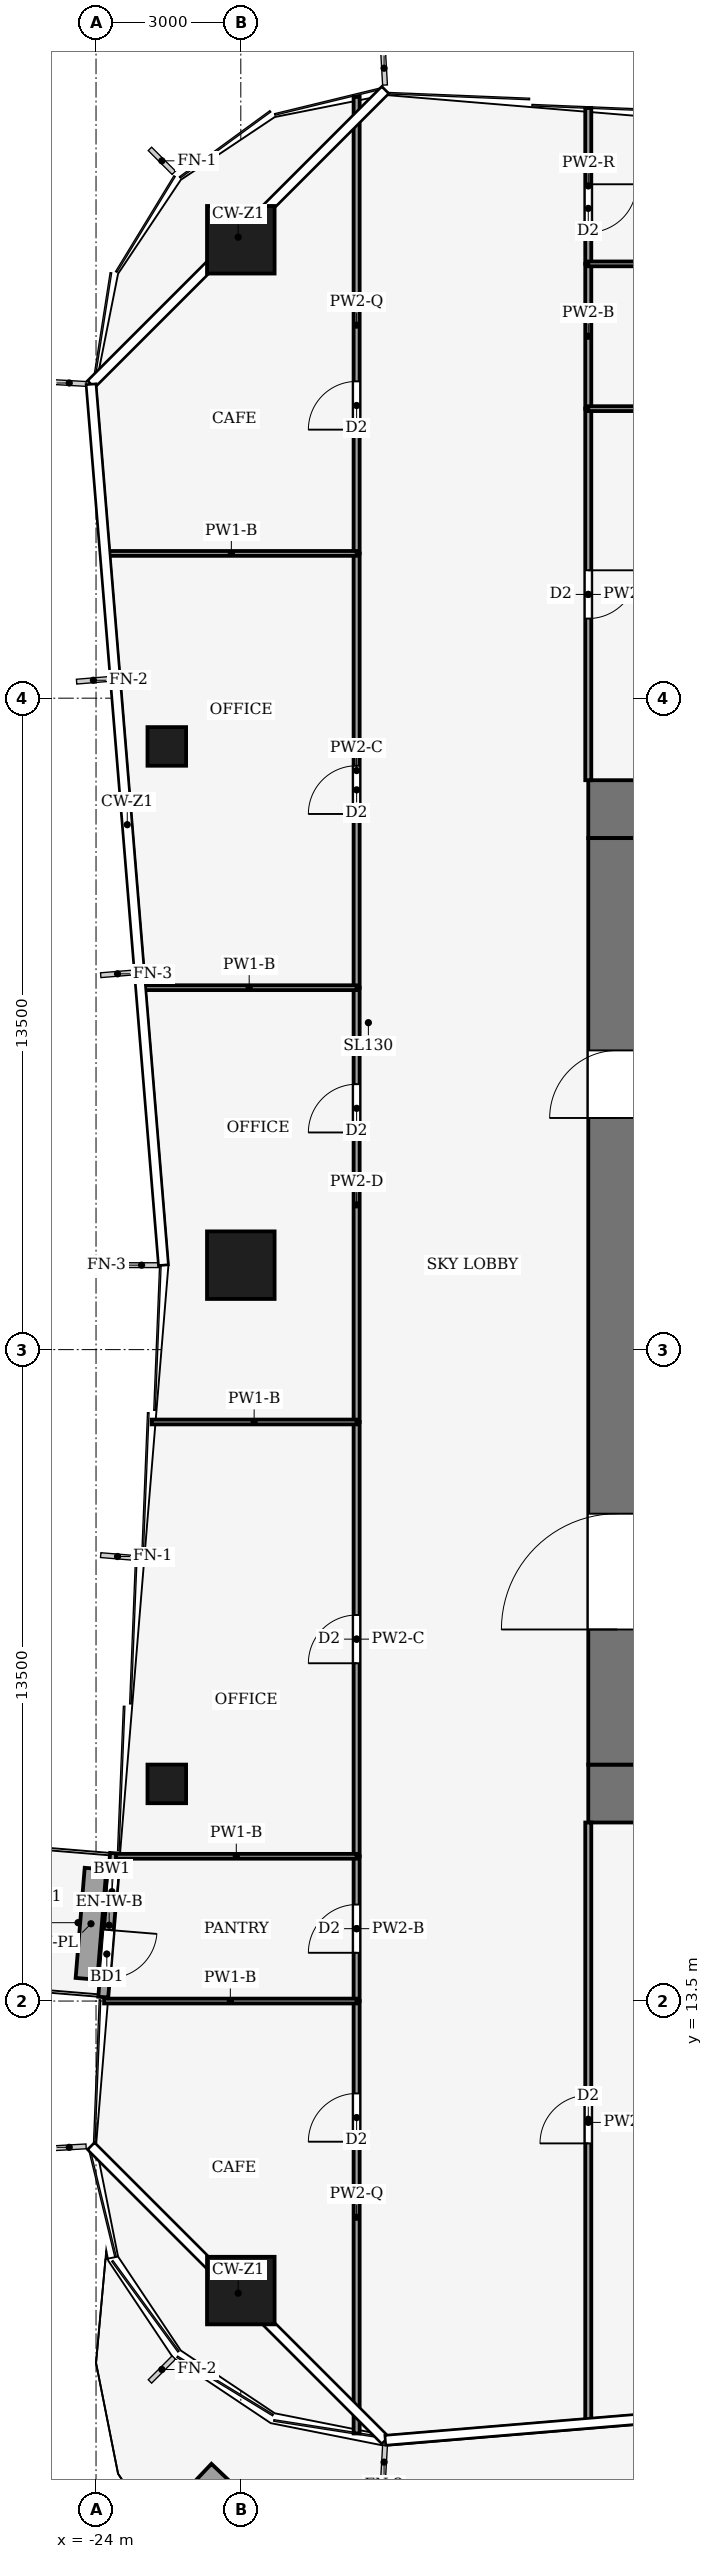
"""IFC4 building model, lengths in metres.
Left out: names, types, materials, properties, quantities, classifications, styles, units other than length and angle.
Written with IfcOpenShell. Run it as: python <this file> out.ifc"""

import sys

from ifc_helpers import new_model, si_unit, direction, frame, frame_2d, origin, origin_2d, place, context, subcontext, project, spatial, rectangle, hollow_rectangle, extrude, element, fill, save


model = new_model("IFC4")
c1 = context("Model", 3, precision=1e-05, world=origin(), true_north=direction((0.0, 1.0)))
c2 = subcontext(c1, "Body", "Model", "MODEL_VIEW")
j1 = project(units=[si_unit("LENGTHUNIT", "METRE"), si_unit("PLANEANGLEUNIT", "RADIAN")], contexts=[c1])
p1 = place(None, origin())
s1 = spatial("IfcSite", under=j1, at=p1, CompositionType="ELEMENT")
p2 = place(p1, origin())
s2 = spatial("IfcBuilding", under=s1, at=p2, CompositionType="ELEMENT")
p3 = place(p2, frame((0.0, 0.0, 65.0)))
s3 = spatial("IfcBuildingStorey", under=s2, at=p3, CompositionType="ELEMENT", Elevation=65.0)
for number, where, z_axis, x_axis in (
    (1, (-13.8, 17.8, -0.13), (0.0, 0.0, 1.0), (1.0, 0.0, 0.0)),
    (2, (-13.8, 38.2, -0.13), (0.0, 0.0, 1.0), (1.0, 0.0, 0.0)),
):
    element("IfcWall", number, at=place(p3, frame(where, z_axis=z_axis, x_axis=x_axis)), inside=s3, PredefinedType="SHEAR", context=c2, shape_type="SweptSolid", body=[
        extrude(rectangle(XDim=27.6, YDim=1.2, at=frame_2d((13.8, 0.0))), origin(), (0.0, 0.0, 1.0), 5.0),
    ])
p4 = place(p3, frame((-13.2, 18.4, -0.13), z_axis=(0.0, 0.0, 1.0), x_axis=(0.0, 1.0, 0.0)))
e3 = element("IfcWall", 3, at=p4, inside=s3, PredefinedType="SHEAR", context=c2, shape_type="SweptSolid", body=[
    extrude(rectangle(XDim=19.2, YDim=1.2, at=frame_2d((9.6, 0.0))), origin(), (0.0, 0.0, 1.0), 5.0),
])
p5 = place(p4, frame((2.8, 0.0, 0.13)))
e4 = element("IfcOpeningElement", 4, at=p5, cuts=e3, PredefinedType="OPENING", context=c2, shape_type="SweptSolid", body=[
    extrude(rectangle(XDim=2.4, YDim=2.4, at=frame_2d((1.2, 1.2))), frame((0.0, 0.61, 0.0), z_axis=(0.0, -1.0, 0.0), x_axis=(1.0, 0.0, 0.0)), (0.0, 0.0, 1.0), 1.22),
])
p6 = place(p4, frame((13.4, 0.0, 0.13)))
e5 = element("IfcOpeningElement", 5, at=p6, cuts=e3, PredefinedType="OPENING", context=c2, shape_type="SweptSolid", body=[
    extrude(rectangle(XDim=1.4, YDim=2.2, at=frame_2d((0.7, 1.1))), frame((0.0, 0.61, 0.0), z_axis=(0.0, -1.0, 0.0), x_axis=(1.0, 0.0, 0.0)), (0.0, 0.0, 1.0), 1.22),
])
for number, where, z_axis, x_axis in (
    (6, (-21.0, 50.0, 0.0), (0.0, 0.0, 1.0), (1.0, 0.0, 0.0)),
    (7, (-21.0, 7.5, 0.0), (0.0, 0.0, 1.0), (1.0, 0.0, 0.0)),
    (8, (-21.0, 28.75, 0.0), (0.0, 0.0, 1.0), (1.0, 0.0, 0.0)),
):
    element("IfcColumn", number, at=place(p3, frame(where, z_axis=z_axis, x_axis=x_axis)), inside=s3, PredefinedType="COLUMN", context=c2, shape_type="SweptSolid", body=[
        extrude(hollow_rectangle(XDim=1.4, YDim=1.4, WallThickness=0.08, at=origin_2d()), origin(), (0.0, 0.0, 1.0), 5.0),
    ])
for number, where, z_axis, x_axis in (
    (9, (-22.534, 18.0, 0.0), (0.0, 0.0, 1.0), (1.0, 0.0, 0.0)),
    (10, (-22.534, 39.5, 0.0), (0.0, 0.0, 1.0), (1.0, 0.0, 0.0)),
):
    element("IfcColumn", number, at=place(p3, frame(where, z_axis=z_axis, x_axis=x_axis)), inside=s3, PredefinedType="COLUMN", context=c2, shape_type="SweptSolid", body=[
        extrude(hollow_rectangle(XDim=0.8, YDim=0.8, WallThickness=0.04, at=origin_2d()), origin(), (0.0, 0.0, 1.0), 5.0),
    ])
p7 = place(p3, frame((-23.605, 16.561, 0.0), z_axis=(0.0, 0.0, 1.0), x_axis=(-0.081903334605, -0.996640278024, 0.0)))
e11 = element("IfcWall", 11, at=p7, inside=s3, PredefinedType="SOLIDWALL", context=c2, shape_type="SweptSolid", body=[
    extrude(rectangle(XDim=2.99, YDim=0.206, at=frame_2d((1.495, 0.0))), origin(), (0.0, 0.0, 1.0), 4.65),
])
p8 = place(p7, frame((1.593, 0.0, 0.0)))
e12 = element("IfcOpeningElement", 12, at=p8, cuts=e11, PredefinedType="OPENING", context=c2, shape_type="SweptSolid", body=[
    extrude(rectangle(XDim=1.0, YDim=2.1, at=frame_2d((0.5, 1.05))), frame((0.0, 0.113, 0.0), z_axis=(0.0, -1.0, 0.0), x_axis=(1.0, 0.0, 0.0)), (0.0, 0.0, 1.0), 0.226),
])
p9 = place(p7, frame((0.396, 0.0, 0.9)))
e13 = element("IfcOpeningElement", 13, at=p9, cuts=e11, PredefinedType="OPENING", context=c2, shape_type="SweptSolid", body=[
    extrude(rectangle(XDim=0.8, YDim=1.2, at=frame_2d((0.4, 0.6))), frame((0.0, 0.113, 0.0), z_axis=(0.0, -1.0, 0.0), x_axis=(1.0, 0.0, 0.0)), (0.0, 0.0, 1.0), 0.226),
])
p10 = place(p3, frame((-24.01, 16.243, 0.0), z_axis=(0.0, 0.0, 1.0), x_axis=(-0.081986639556, -0.996633428566, 0.0)))
e14 = element("IfcWall", 14, at=p10, inside=s3, PredefinedType="USERDEFINED", context=c2, shape_type="SweptSolid", body=[
    extrude(rectangle(XDim=2.29, YDim=0.45, at=frame_2d((1.145, 0.0))), origin(), (0.0, 0.0, 1.0), 0.4),
])
p11 = place(p3, frame((-20.032, 1.794, 0.0), z_axis=(0.0, 0.0, 1.0), x_axis=(-0.725500966542, 0.688221147267, 0.0)))
e15 = element("IfcWall", 15, at=p11, inside=s3, PredefinedType="USERDEFINED", context=c2, shape_type="SweptSolid", body=[
    extrude(rectangle(XDim=2.6, YDim=0.9, at=frame_2d((1.3, 0.0))), origin(), (0.0, 0.0, 1.0), 0.5),
])
p12 = place(p3, frame((-18.6, 4.539, 0.0), z_axis=(0.0, 0.0, 1.0), x_axis=(0.0, 1.0, 0.0)))
e16 = element("IfcWall", 16, at=p12, inside=s3, PredefinedType="PARTITIONING", context=c2, shape_type="SweptSolid", body=[
    extrude(rectangle(XDim=8.961, YDim=0.125, at=frame_2d((4.48, 0.0))), origin(), (0.0, 0.0, 1.0), 3.93),
])
p13 = place(p12, frame((6.046, 0.0, 0.0)))
e17 = element("IfcOpeningElement", 17, at=p13, cuts=e16, PredefinedType="OPENING", context=c2, shape_type="SweptSolid", body=[
    extrude(rectangle(XDim=1.0, YDim=2.1, at=frame_2d((0.5, 1.05))), frame((0.0, 0.073, 0.0), z_axis=(0.0, -1.0, 0.0), x_axis=(1.0, 0.0, 0.0)), (0.0, 0.0, 1.0), 0.145),
])
p14 = place(p3, frame((-18.6, 13.5, 0.0), z_axis=(0.0, 0.0, 1.0), x_axis=(0.0, 1.0, 0.0)))
e18 = element("IfcWall", 18, at=p14, inside=s3, PredefinedType="PARTITIONING", context=c2, shape_type="SweptSolid", body=[
    extrude(rectangle(XDim=3.0, YDim=0.125, at=frame_2d((1.5, 0.0))), origin(), (0.0, 0.0, 1.0), 4.87),
])
p15 = place(p14, frame((1.0, 0.0, 0.0)))
e19 = element("IfcOpeningElement", 19, at=p15, cuts=e18, PredefinedType="OPENING", context=c2, shape_type="SweptSolid", body=[
    extrude(rectangle(XDim=1.0, YDim=2.1, at=frame_2d((0.5, 1.05))), frame((0.0, 0.073, 0.0), z_axis=(0.0, -1.0, 0.0), x_axis=(1.0, 0.0, 0.0)), (0.0, 0.0, 1.0), 0.145),
])
p16 = place(p3, frame((-18.6, 16.5, 0.0), z_axis=(0.0, 0.0, 1.0), x_axis=(0.0, 1.0, 0.0)))
e20 = element("IfcWall", 20, at=p16, inside=s3, PredefinedType="PARTITIONING", context=c2, shape_type="SweptSolid", body=[
    extrude(rectangle(XDim=9.0, YDim=0.125, at=frame_2d((4.5, 0.0))), origin(), (0.0, 0.0, 1.0), 4.14),
])
p17 = place(p16, frame((4.0, 0.0, 0.0)))
e21 = element("IfcOpeningElement", 21, at=p17, cuts=e20, PredefinedType="OPENING", context=c2, shape_type="SweptSolid", body=[
    extrude(rectangle(XDim=1.0, YDim=2.1, at=frame_2d((0.5, 1.05))), frame((0.0, 0.073, 0.0), z_axis=(0.0, -1.0, 0.0), x_axis=(1.0, 0.0, 0.0)), (0.0, 0.0, 1.0), 0.145),
])
p18 = place(p3, frame((-18.6, 25.5, 0.0), z_axis=(0.0, 0.0, 1.0), x_axis=(0.0, 1.0, 0.0)))
e22 = element("IfcWall", 22, at=p18, inside=s3, PredefinedType="PARTITIONING", context=c2, shape_type="SweptSolid", body=[
    extrude(rectangle(XDim=9.0, YDim=0.125, at=frame_2d((4.5, 0.0))), origin(), (0.0, 0.0, 1.0), 4.48),
])
p19 = place(p18, frame((6.0, 0.0, 0.0)))
e23 = element("IfcOpeningElement", 23, at=p19, cuts=e22, PredefinedType="OPENING", context=c2, shape_type="SweptSolid", body=[
    extrude(rectangle(XDim=1.0, YDim=2.1, at=frame_2d((0.5, 1.05))), frame((0.0, 0.073, 0.0), z_axis=(0.0, -1.0, 0.0), x_axis=(1.0, 0.0, 0.0)), (0.0, 0.0, 1.0), 0.145),
])
p20 = place(p3, frame((-18.6, 34.5, 0.0), z_axis=(0.0, 0.0, 1.0), x_axis=(0.0, 1.0, 0.0)))
e24 = element("IfcWall", 24, at=p20, inside=s3, PredefinedType="PARTITIONING", context=c2, shape_type="SweptSolid", body=[
    extrude(rectangle(XDim=9.0, YDim=0.125, at=frame_2d((4.5, 0.0))), origin(), (0.0, 0.0, 1.0), 4.14),
])
p21 = place(p20, frame((3.6, 0.0, 0.0)))
e25 = element("IfcOpeningElement", 25, at=p21, cuts=e24, PredefinedType="OPENING", context=c2, shape_type="SweptSolid", body=[
    extrude(rectangle(XDim=1.0, YDim=2.1, at=frame_2d((0.5, 1.05))), frame((0.0, 0.073, 0.0), z_axis=(0.0, -1.0, 0.0), x_axis=(1.0, 0.0, 0.0)), (0.0, 0.0, 1.0), 0.145),
])
p22 = place(p3, frame((-18.6, 43.5, 0.0), z_axis=(0.0, 0.0, 1.0), x_axis=(0.0, 1.0, 0.0)))
e26 = element("IfcWall", 26, at=p22, inside=s3, PredefinedType="PARTITIONING", context=c2, shape_type="SweptSolid", body=[
    extrude(rectangle(XDim=9.461, YDim=0.125, at=frame_2d((4.73, 0.0))), origin(), (0.0, 0.0, 1.0), 3.93),
])
p23 = place(p22, frame((2.565, 0.0, 0.0)))
e27 = element("IfcOpeningElement", 27, at=p23, cuts=e26, PredefinedType="OPENING", context=c2, shape_type="SweptSolid", body=[
    extrude(rectangle(XDim=1.0, YDim=2.1, at=frame_2d((0.5, 1.05))), frame((0.0, 0.073, 0.0), z_axis=(0.0, -1.0, 0.0), x_axis=(1.0, 0.0, 0.0)), (0.0, 0.0, 1.0), 0.145),
])
p24 = place(p3, frame((-13.8, 4.77, 0.0), z_axis=(0.0, 0.0, 1.0), x_axis=(0.0, 1.0, 0.0)))
e28 = element("IfcWall", 28, at=p24, inside=s3, PredefinedType="PARTITIONING", context=c2, shape_type="SweptSolid", body=[
    extrude(rectangle(XDim=12.43, YDim=0.125, at=frame_2d((6.215, 0.0))), origin(), (0.0, 0.0, 1.0), 4.04),
])
p25 = place(p24, frame((5.78, 0.0, 0.0)))
e29 = element("IfcOpeningElement", 29, at=p25, cuts=e28, PredefinedType="OPENING", context=c2, shape_type="SweptSolid", body=[
    extrude(rectangle(XDim=1.0, YDim=2.1, at=frame_2d((0.5, 1.05))), frame((0.0, 0.073, 0.0), z_axis=(0.0, -1.0, 0.0), x_axis=(1.0, 0.0, 0.0)), (0.0, 0.0, 1.0), 0.145),
])
p26 = place(p3, frame((-13.8, 46.5, 0.0), z_axis=(0.0, 0.0, 1.0), x_axis=(0.0, -1.0, 0.0)))
e30 = element("IfcWall", 30, at=p26, inside=s3, PredefinedType="PARTITIONING", context=c2, shape_type="SweptSolid", body=[
    extrude(rectangle(XDim=7.7, YDim=0.125, at=frame_2d((3.85, 0.0))), origin(), (0.0, 0.0, 1.0), 4.14),
])
p27 = place(p26, frame((3.35, 0.0, 0.0)))
e31 = element("IfcOpeningElement", 31, at=p27, cuts=e30, PredefinedType="OPENING", context=c2, shape_type="SweptSolid", body=[
    extrude(rectangle(XDim=1.0, YDim=2.1, at=frame_2d((0.5, 1.05))), frame((0.0, 0.073, 0.0), z_axis=(0.0, -1.0, 0.0), x_axis=(1.0, 0.0, 0.0)), (0.0, 0.0, 1.0), 0.145),
])
p28 = place(p3, frame((-13.8, 46.5, 0.0), z_axis=(0.0, 0.0, 1.0), x_axis=(0.0, 1.0, 0.0)))
e32 = element("IfcWall", 32, at=p28, inside=s3, PredefinedType="PARTITIONING", context=c2, shape_type="SweptSolid", body=[
    extrude(rectangle(XDim=3.0, YDim=0.125, at=frame_2d((1.5, 0.0))), origin(), (0.0, 0.0, 1.0), 4.87),
])
p29 = place(p3, frame((-13.8, 52.73, 0.0), z_axis=(0.0, 0.0, 1.0), x_axis=(0.0, -1.0, 0.0)))
e33 = element("IfcWall", 33, at=p29, inside=s3, PredefinedType="PARTITIONING", context=c2, shape_type="SweptSolid", body=[
    extrude(rectangle(XDim=3.23, YDim=0.125, at=frame_2d((1.615, 0.0))), origin(), (0.0, 0.0, 1.0), 4.04),
])
p30 = place(p29, frame((1.58, 0.0, 0.0)))
e34 = element("IfcOpeningElement", 34, at=p30, cuts=e33, PredefinedType="OPENING", context=c2, shape_type="SweptSolid", body=[
    extrude(rectangle(XDim=1.0, YDim=2.1, at=frame_2d((0.5, 1.05))), frame((0.0, 0.073, 0.0), z_axis=(0.0, -1.0, 0.0), x_axis=(1.0, 0.0, 0.0)), (0.0, 0.0, 1.0), 0.145),
])
p31 = place(p3, frame((-18.6, 13.5, 0.0), z_axis=(0.0, 0.0, 1.0), x_axis=(-1.0, 0.0, 0.0)))
e35 = element("IfcWall", 35, at=p31, inside=s3, PredefinedType="PARTITIONING", context=c2, shape_type="SweptSolid", body=[
    extrude(rectangle(XDim=5.233, YDim=0.1, at=frame_2d((2.617, 0.0))), origin(), (0.0, 0.0, 1.0), 4.04),
])
p32 = place(p3, frame((-18.6, 16.5, 0.0), z_axis=(0.0, 0.0, 1.0), x_axis=(-1.0, 0.0, 0.0)))
e36 = element("IfcWall", 36, at=p32, inside=s3, PredefinedType="PARTITIONING", context=c2, shape_type="SweptSolid", body=[
    extrude(rectangle(XDim=4.987, YDim=0.1, at=frame_2d((2.493, 0.0))), origin(), (0.0, 0.0, 1.0), 4.04),
])
p33 = place(p3, frame((-18.6, 25.5, 0.0), z_axis=(0.0, 0.0, 1.0), x_axis=(-1.0, 0.0, 0.0)))
e37 = element("IfcWall", 37, at=p33, inside=s3, PredefinedType="PARTITIONING", context=c2, shape_type="SweptSolid", body=[
    extrude(rectangle(XDim=4.247, YDim=0.1, at=frame_2d((2.124, 0.0))), origin(), (0.0, 0.0, 1.0), 4.04),
])
p34 = place(p3, frame((-18.6, 34.5, 0.0), z_axis=(0.0, 0.0, 1.0), x_axis=(-1.0, 0.0, 0.0)))
e38 = element("IfcWall", 38, at=p34, inside=s3, PredefinedType="PARTITIONING", context=c2, shape_type="SweptSolid", body=[
    extrude(rectangle(XDim=4.452, YDim=0.1, at=frame_2d((2.226, 0.0))), origin(), (0.0, 0.0, 1.0), 4.04),
])
p35 = place(p3, frame((-18.6, 43.5, 0.0), z_axis=(0.0, 0.0, 1.0), x_axis=(-1.0, 0.0, 0.0)))
e39 = element("IfcWall", 39, at=p35, inside=s3, PredefinedType="PARTITIONING", context=c2, shape_type="SweptSolid", body=[
    extrude(rectangle(XDim=5.192, YDim=0.1, at=frame_2d((2.596, 0.0))), origin(), (0.0, 0.0, 1.0), 4.04),
])
p36 = place(p3, frame((-13.8, 46.5, 0.0), z_axis=(0.0, 0.0, 1.0), x_axis=(1.0, 0.0, 0.0)))
e40 = element("IfcWall", 40, at=p36, inside=s3, PredefinedType="PARTITIONING", context=c2, shape_type="SweptSolid", body=[
    extrude(rectangle(XDim=3.3, YDim=0.1, at=frame_2d((1.65, 0.0))), origin(), (0.0, 0.0, 1.0), 4.39),
])
p37 = place(p36, frame((1.15, 0.0, 0.0)))
e41 = element("IfcOpeningElement", 41, at=p37, cuts=e40, PredefinedType="OPENING", context=c2, shape_type="SweptSolid", body=[
    extrude(rectangle(XDim=1.0, YDim=2.1, at=frame_2d((0.5, 1.05))), frame((0.0, 0.06, 0.0), z_axis=(0.0, -1.0, 0.0), x_axis=(1.0, 0.0, 0.0)), (0.0, 0.0, 1.0), 0.12),
])
p38 = place(p3, frame((-10.5, 49.5, 0.0), z_axis=(0.0, 0.0, 1.0), x_axis=(-1.0, 0.0, 0.0)))
e42 = element("IfcWall", 42, at=p38, inside=s3, PredefinedType="PARTITIONING", context=c2, shape_type="SweptSolid", body=[
    extrude(rectangle(XDim=3.3, YDim=0.1, at=frame_2d((1.65, 0.0))), origin(), (0.0, 0.0, 1.0), 4.39),
])
p39 = place(p8, origin())
e43 = element("IfcDoor", 43, at=p39, inside=s3, OperationType="SINGLE_SWING_RIGHT", PredefinedType="DOOR", context=c2, shape_type="SweptSolid", body=[
    extrude(rectangle(XDim=1.0, YDim=2.1, at=frame_2d((0.5, 1.05))), frame((0.0, 0.025, 0.0), z_axis=(0.0, -1.0, 0.0), x_axis=(1.0, 0.0, 0.0)), (0.0, 0.0, 1.0), 0.05),
])
fill(e12, e43)
p40 = place(p9, origin())
e44 = element("IfcWindow", 44, at=p40, inside=s3, PartitioningType="SINGLE_PANEL", PredefinedType="WINDOW", context=c2, shape_type="SweptSolid", body=[
    extrude(rectangle(XDim=0.8, YDim=1.2, at=frame_2d((0.4, 0.6))), frame((0.0, 0.03, 0.0), z_axis=(0.0, -1.0, 0.0), x_axis=(1.0, 0.0, 0.0)), (0.0, 0.0, 1.0), 0.06),
])
fill(e13, e44)
p41 = place(p5, origin())
e45 = element("IfcDoor", 45, at=p41, inside=s3, OperationType="DOUBLE_DOOR_SINGLE_SWING", PredefinedType="DOOR", context=c2, shape_type="SweptSolid", body=[
    extrude(rectangle(XDim=2.4, YDim=2.4, at=frame_2d((1.2, 1.2))), frame((0.0, 0.025, 0.0), z_axis=(0.0, -1.0, 0.0), x_axis=(1.0, 0.0, 0.0)), (0.0, 0.0, 1.0), 0.05),
])
fill(e4, e45)
p42 = place(p6, origin())
e46 = element("IfcDoor", 46, at=p42, inside=s3, OperationType="SINGLE_SWING_LEFT", PredefinedType="DOOR", context=c2, shape_type="SweptSolid", body=[
    extrude(rectangle(XDim=1.4, YDim=2.2, at=frame_2d((0.7, 1.1))), frame((0.0, 0.025, 0.0), z_axis=(0.0, -1.0, 0.0), x_axis=(1.0, 0.0, 0.0)), (0.0, 0.0, 1.0), 0.05),
])
fill(e5, e46)
p43 = place(p13, origin())
e47 = element("IfcDoor", 47, at=p43, inside=s3, OperationType="SINGLE_SWING_RIGHT", PredefinedType="DOOR", context=c2, shape_type="SweptSolid", body=[
    extrude(rectangle(XDim=1.0, YDim=2.1, at=frame_2d((0.5, 1.05))), frame((0.0, 0.025, 0.0), z_axis=(0.0, -1.0, 0.0), x_axis=(1.0, 0.0, 0.0)), (0.0, 0.0, 1.0), 0.05),
])
fill(e17, e47)
p44 = place(p15, origin())
e48 = element("IfcDoor", 48, at=p44, inside=s3, OperationType="SINGLE_SWING_RIGHT", PredefinedType="DOOR", context=c2, shape_type="SweptSolid", body=[
    extrude(rectangle(XDim=1.0, YDim=2.1, at=frame_2d((0.5, 1.05))), frame((0.0, 0.025, 0.0), z_axis=(0.0, -1.0, 0.0), x_axis=(1.0, 0.0, 0.0)), (0.0, 0.0, 1.0), 0.05),
])
fill(e19, e48)
p45 = place(p17, origin())
e49 = element("IfcDoor", 49, at=p45, inside=s3, OperationType="SINGLE_SWING_LEFT", PredefinedType="DOOR", context=c2, shape_type="SweptSolid", body=[
    extrude(rectangle(XDim=1.0, YDim=2.1, at=frame_2d((0.5, 1.05))), frame((0.0, 0.025, 0.0), z_axis=(0.0, -1.0, 0.0), x_axis=(1.0, 0.0, 0.0)), (0.0, 0.0, 1.0), 0.05),
])
fill(e21, e49)
p46 = place(p19, origin())
e50 = element("IfcDoor", 50, at=p46, inside=s3, OperationType="SINGLE_SWING_RIGHT", PredefinedType="DOOR", context=c2, shape_type="SweptSolid", body=[
    extrude(rectangle(XDim=1.0, YDim=2.1, at=frame_2d((0.5, 1.05))), frame((0.0, 0.025, 0.0), z_axis=(0.0, -1.0, 0.0), x_axis=(1.0, 0.0, 0.0)), (0.0, 0.0, 1.0), 0.05),
])
fill(e23, e50)
p47 = place(p21, origin())
e51 = element("IfcDoor", 51, at=p47, inside=s3, OperationType="SINGLE_SWING_LEFT", PredefinedType="DOOR", context=c2, shape_type="SweptSolid", body=[
    extrude(rectangle(XDim=1.0, YDim=2.1, at=frame_2d((0.5, 1.05))), frame((0.0, 0.025, 0.0), z_axis=(0.0, -1.0, 0.0), x_axis=(1.0, 0.0, 0.0)), (0.0, 0.0, 1.0), 0.05),
])
fill(e25, e51)
p48 = place(p23, origin())
e52 = element("IfcDoor", 52, at=p48, inside=s3, OperationType="SINGLE_SWING_LEFT", PredefinedType="DOOR", context=c2, shape_type="SweptSolid", body=[
    extrude(rectangle(XDim=1.0, YDim=2.1, at=frame_2d((0.5, 1.05))), frame((0.0, 0.025, 0.0), z_axis=(0.0, -1.0, 0.0), x_axis=(1.0, 0.0, 0.0)), (0.0, 0.0, 1.0), 0.05),
])
fill(e27, e52)
p49 = place(p25, origin())
e53 = element("IfcDoor", 53, at=p49, inside=s3, OperationType="SINGLE_SWING_RIGHT", PredefinedType="DOOR", context=c2, shape_type="SweptSolid", body=[
    extrude(rectangle(XDim=1.0, YDim=2.1, at=frame_2d((0.5, 1.05))), frame((0.0, 0.025, 0.0), z_axis=(0.0, -1.0, 0.0), x_axis=(1.0, 0.0, 0.0)), (0.0, 0.0, 1.0), 0.05),
])
fill(e29, e53)
p50 = place(p27, origin())
e54 = element("IfcDoor", 54, at=p50, inside=s3, OperationType="SINGLE_SWING_RIGHT", PredefinedType="DOOR", context=c2, shape_type="SweptSolid", body=[
    extrude(rectangle(XDim=1.0, YDim=2.1, at=frame_2d((0.5, 1.05))), frame((0.0, 0.025, 0.0), z_axis=(0.0, -1.0, 0.0), x_axis=(1.0, 0.0, 0.0)), (0.0, 0.0, 1.0), 0.05),
])
fill(e31, e54)
p51 = place(p30, origin())
e55 = element("IfcDoor", 55, at=p51, inside=s3, OperationType="SINGLE_SWING_RIGHT", PredefinedType="DOOR", context=c2, shape_type="SweptSolid", body=[
    extrude(rectangle(XDim=1.0, YDim=2.1, at=frame_2d((0.5, 1.05))), frame((0.0, 0.025, 0.0), z_axis=(0.0, -1.0, 0.0), x_axis=(1.0, 0.0, 0.0)), (0.0, 0.0, 1.0), 0.05),
])
fill(e34, e55)
save(model, sys.argv[1])
